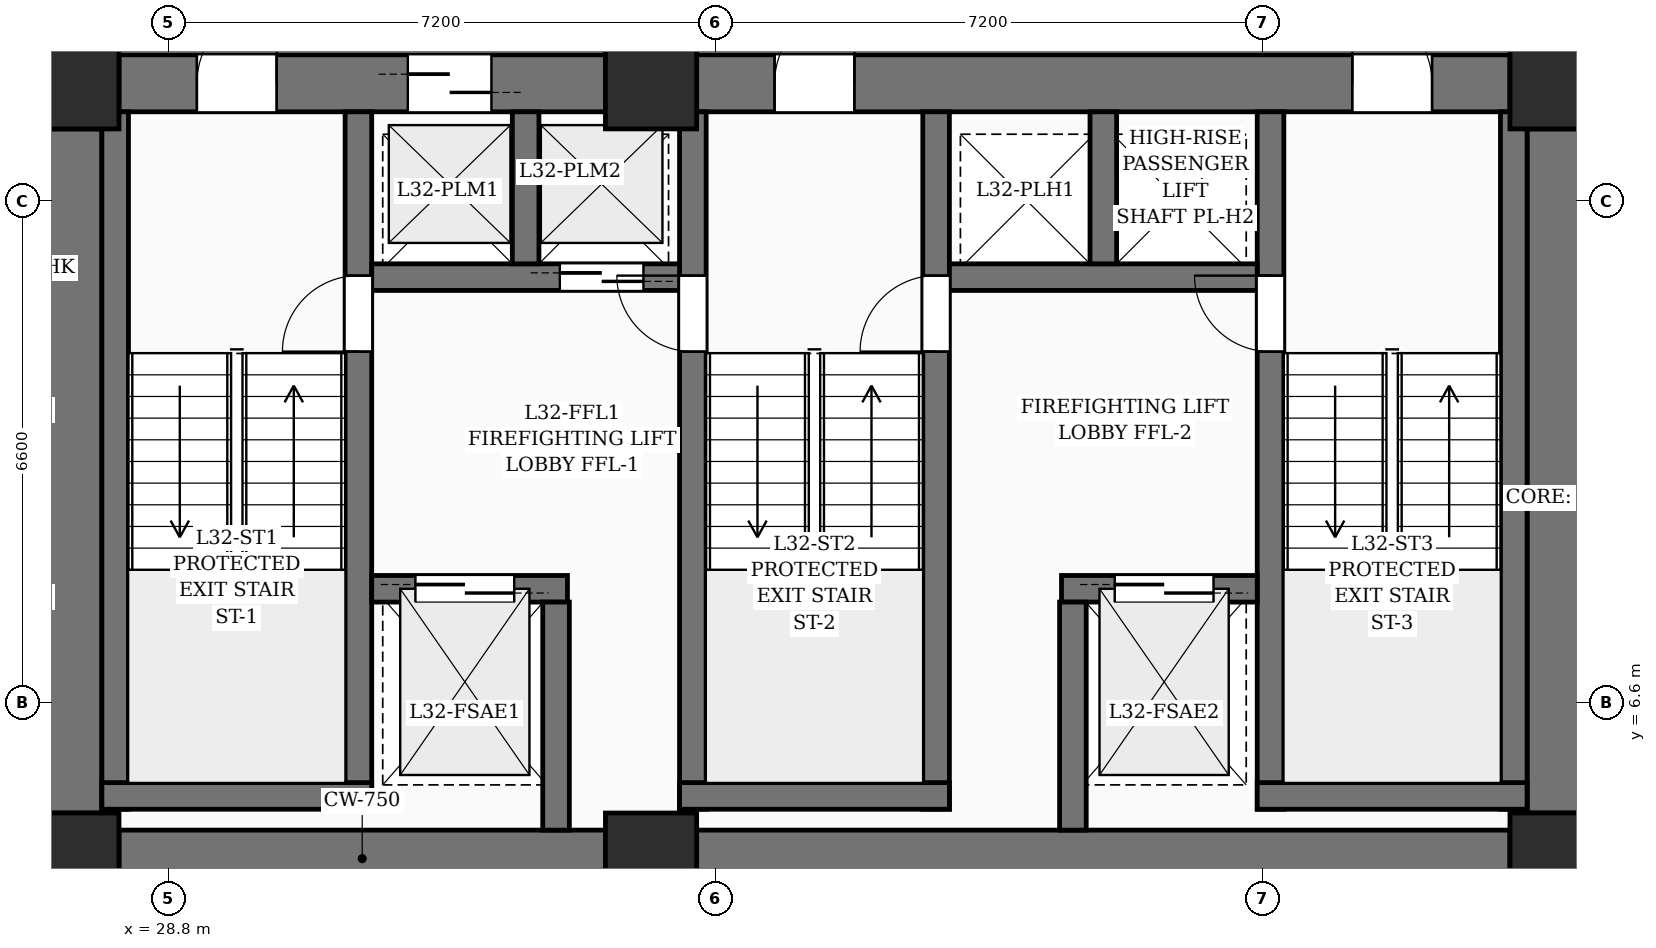
"""IFC4 building model, lengths in metres.
Left out: names, types, materials, properties, quantities, classifications, styles, units other than length and angle.
Written with IfcOpenShell. Run it as: python <this file> out.ifc"""

import sys

from ifc_helpers import new_model, si_unit, direction, frame, frame_2d, origin, origin_2d, place, context, subcontext, project, spatial, rectangle, extrude, element, fill, save


model = new_model("IFC4")
c1 = context("Model", 3, precision=1e-05, world=origin(), true_north=direction((0.0, 1.0)))
c2 = subcontext(c1, "Body", "Model", "MODEL_VIEW")
j1 = project(units=[si_unit("LENGTHUNIT", "METRE"), si_unit("PLANEANGLEUNIT", "RADIAN")], contexts=[c1])
p1 = place(None, origin())
s1 = spatial("IfcSite", under=j1, at=p1, CompositionType="ELEMENT")
p2 = place(p1, origin())
s2 = spatial("IfcBuilding", under=s1, at=p2, CompositionType="ELEMENT")
p3 = place(p2, frame((0.0, 0.0, 128.4)))
s3 = spatial("IfcBuildingStorey", under=s2, at=p3, CompositionType="ELEMENT", Elevation=128.4)
for number, where, z_axis, x_axis in (
    (1, (27.55, 4.55, 0.0), (0.0, 0.0, 1.0), (1.0, 0.0, 0.0)),
    (2, (35.15, 4.55, 0.0), (0.0, 0.0, 1.0), (1.0, 0.0, 0.0)),
    (3, (47.05, 4.55, 0.0), (0.0, 0.0, 1.0), (1.0, 0.0, 0.0)),
    (4, (27.55, 14.75, 0.0), (0.0, 0.0, 1.0), (1.0, 0.0, 0.0)),
    (5, (35.15, 14.75, 0.0), (0.0, 0.0, 1.0), (1.0, 0.0, 0.0)),
    (6, (47.05, 14.75, 0.0), (0.0, 0.0, 1.0), (1.0, 0.0, 0.0)),
):
    element("IfcColumn", number, at=place(p3, frame(where, z_axis=z_axis, x_axis=x_axis)), inside=s3, PredefinedType="COLUMN", context=c2, shape_type="SweptSolid", body=[
        extrude(rectangle(XDim=1.2, YDim=1.2, at=origin_2d()), origin(), (0.0, 0.0, 1.0), 3.6),
    ])
p4 = place(p3, frame((28.15, 4.55, 0.0), z_axis=(0.0, 0.0, 1.0), x_axis=(1.0, 0.0, 0.0)))
e7 = element("IfcWall", 7, at=p4, inside=s3, PredefinedType="SHEAR", context=c2, shape_type="SweptSolid", body=[
    extrude(rectangle(XDim=6.4, YDim=0.75, at=frame_2d((3.2, 0.0))), origin(), (0.0, 0.0, 1.0), 3.6),
])
p5 = place(p3, frame((35.75, 4.55, 0.0), z_axis=(0.0, 0.0, 1.0), x_axis=(1.0, 0.0, 0.0)))
e8 = element("IfcWall", 8, at=p5, inside=s3, PredefinedType="SHEAR", context=c2, shape_type="SweptSolid", body=[
    extrude(rectangle(XDim=10.7, YDim=0.75, at=frame_2d((5.35, 0.0))), origin(), (0.0, 0.0, 1.0), 3.6),
])
p6 = place(p3, frame((28.15, 14.75, 0.0), z_axis=(0.0, 0.0, 1.0), x_axis=(1.0, 0.0, 0.0)))
e9 = element("IfcWall", 9, at=p6, inside=s3, PredefinedType="SHEAR", context=c2, shape_type="SweptSolid", body=[
    extrude(rectangle(XDim=6.4, YDim=0.75, at=frame_2d((3.2, 0.0))), origin(), (0.0, 0.0, 1.0), 3.6),
])
p7 = place(p6, frame((1.025, 0.0, 0.0)))
e10 = element("IfcOpeningElement", 10, at=p7, cuts=e9, PredefinedType="OPENING", context=c2, shape_type="SweptSolid", body=[
    extrude(rectangle(XDim=1.05, YDim=2.15, at=frame_2d((0.525, 1.075))), frame((0.0, 0.385, 0.0), z_axis=(0.0, -1.0, 0.0), x_axis=(1.0, 0.0, 0.0)), (0.0, 0.0, 1.0), 0.77),
])
p8 = place(p6, frame((3.8, 0.0, 0.0)))
e11 = element("IfcOpeningElement", 11, at=p8, cuts=e9, PredefinedType="OPENING", context=c2, shape_type="SweptSolid", body=[
    extrude(rectangle(XDim=1.1, YDim=2.2, at=frame_2d((0.55, 1.1))), frame((0.0, 0.385, 0.0), z_axis=(0.0, -1.0, 0.0), x_axis=(1.0, 0.0, 0.0)), (0.0, 0.0, 1.0), 0.77),
])
p9 = place(p3, frame((35.75, 14.75, 0.0), z_axis=(0.0, 0.0, 1.0), x_axis=(1.0, 0.0, 0.0)))
e12 = element("IfcWall", 12, at=p9, inside=s3, PredefinedType="SHEAR", context=c2, shape_type="SweptSolid", body=[
    extrude(rectangle(XDim=10.7, YDim=0.75, at=frame_2d((5.35, 0.0))), origin(), (0.0, 0.0, 1.0), 3.6),
])
p10 = place(p9, frame((1.025, 0.0, 0.0)))
e13 = element("IfcOpeningElement", 13, at=p10, cuts=e12, PredefinedType="OPENING", context=c2, shape_type="SweptSolid", body=[
    extrude(rectangle(XDim=1.05, YDim=2.15, at=frame_2d((0.525, 1.075))), frame((0.0, 0.385, 0.0), z_axis=(0.0, -1.0, 0.0), x_axis=(1.0, 0.0, 0.0)), (0.0, 0.0, 1.0), 0.77),
])
p11 = place(p9, frame((8.625, 0.0, 0.0)))
e14 = element("IfcOpeningElement", 14, at=p11, cuts=e12, PredefinedType="OPENING", context=c2, shape_type="SweptSolid", body=[
    extrude(rectangle(XDim=1.05, YDim=2.15, at=frame_2d((0.525, 1.075))), frame((0.0, 0.385, 0.0), z_axis=(0.0, -1.0, 0.0), x_axis=(1.0, 0.0, 0.0)), (0.0, 0.0, 1.0), 0.77),
])
for number, where, z_axis, x_axis in (
    (15, (27.55, 5.15, 0.0), (0.0, 0.0, 1.0), (0.0, 1.0, 0.0)),
    (16, (47.05, 5.15, 0.0), (0.0, 0.0, 1.0), (0.0, 1.0, 0.0)),
):
    element("IfcWall", number, at=place(p3, frame(where, z_axis=z_axis, x_axis=x_axis)), inside=s3, PredefinedType="SHEAR", context=c2, shape_type="SweptSolid", body=[
        extrude(rectangle(XDim=9.0, YDim=0.75, at=frame_2d((4.5, 0.0))), origin(), (0.0, 0.0, 1.0), 3.6),
    ])
p12 = place(p3, frame((28.1, 5.2, 0.0), z_axis=(0.0, 0.0, 1.0), x_axis=(0.0, 1.0, 0.0)))
e17 = element("IfcWall", 17, at=p12, inside=s3, PredefinedType="SOLIDWALL", context=c2, shape_type="SweptSolid", body=[
    extrude(rectangle(XDim=9.175, YDim=0.35, at=frame_2d((4.587, 0.0))), origin(), (0.0, 0.0, 1.0), 3.6),
])
p13 = place(p3, frame((31.3, 5.2, 0.0), z_axis=(0.0, 0.0, 1.0), x_axis=(0.0, 1.0, 0.0)))
e18 = element("IfcWall", 18, at=p13, inside=s3, PredefinedType="SOLIDWALL", context=c2, shape_type="SweptSolid", body=[
    extrude(rectangle(XDim=9.175, YDim=0.35, at=frame_2d((4.587, 0.0))), origin(), (0.0, 0.0, 1.0), 3.6),
])
p14 = place(p13, frame((6.02, 0.0, 0.0)))
e19 = element("IfcOpeningElement", 19, at=p14, cuts=e18, PredefinedType="OPENING", context=c2, shape_type="SweptSolid", body=[
    extrude(rectangle(XDim=1.0, YDim=2.15, at=frame_2d((0.5, 1.075))), frame((0.0, 0.185, 0.0), z_axis=(0.0, -1.0, 0.0), x_axis=(1.0, 0.0, 0.0)), (0.0, 0.0, 1.0), 0.37),
])
p15 = place(p3, frame((27.925, 5.375, 0.0), z_axis=(0.0, 0.0, 1.0), x_axis=(1.0, 0.0, 0.0)))
e20 = element("IfcWall", 20, at=p15, inside=s3, PredefinedType="SOLIDWALL", context=c2, shape_type="SweptSolid", body=[
    extrude(rectangle(XDim=3.55, YDim=0.35, at=frame_2d((1.775, 0.0))), origin(), (0.0, 0.0, 1.0), 3.6),
])
p16 = place(p3, frame((35.7, 5.2, 0.0), z_axis=(0.0, 0.0, 1.0), x_axis=(0.0, 1.0, 0.0)))
e21 = element("IfcWall", 21, at=p16, inside=s3, PredefinedType="SOLIDWALL", context=c2, shape_type="SweptSolid", body=[
    extrude(rectangle(XDim=9.175, YDim=0.35, at=frame_2d((4.587, 0.0))), origin(), (0.0, 0.0, 1.0), 3.6),
])
p17 = place(p16, frame((6.02, 0.0, 0.0)))
e22 = element("IfcOpeningElement", 22, at=p17, cuts=e21, PredefinedType="OPENING", context=c2, shape_type="SweptSolid", body=[
    extrude(rectangle(XDim=1.0, YDim=2.15, at=frame_2d((0.5, 1.075))), frame((0.0, 0.185, 0.0), z_axis=(0.0, -1.0, 0.0), x_axis=(1.0, 0.0, 0.0)), (0.0, 0.0, 1.0), 0.37),
])
p18 = place(p3, frame((38.9, 5.2, 0.0), z_axis=(0.0, 0.0, 1.0), x_axis=(0.0, 1.0, 0.0)))
e23 = element("IfcWall", 23, at=p18, inside=s3, PredefinedType="SOLIDWALL", context=c2, shape_type="SweptSolid", body=[
    extrude(rectangle(XDim=9.175, YDim=0.35, at=frame_2d((4.587, 0.0))), origin(), (0.0, 0.0, 1.0), 3.6),
])
p19 = place(p18, frame((6.02, 0.0, 0.0)))
e24 = element("IfcOpeningElement", 24, at=p19, cuts=e23, PredefinedType="OPENING", context=c2, shape_type="SweptSolid", body=[
    extrude(rectangle(XDim=1.0, YDim=2.15, at=frame_2d((0.5, 1.075))), frame((0.0, 0.185, 0.0), z_axis=(0.0, -1.0, 0.0), x_axis=(1.0, 0.0, 0.0)), (0.0, 0.0, 1.0), 0.37),
])
p20 = place(p3, frame((35.525, 5.375, 0.0), z_axis=(0.0, 0.0, 1.0), x_axis=(1.0, 0.0, 0.0)))
e25 = element("IfcWall", 25, at=p20, inside=s3, PredefinedType="SOLIDWALL", context=c2, shape_type="SweptSolid", body=[
    extrude(rectangle(XDim=3.55, YDim=0.35, at=frame_2d((1.775, 0.0))), origin(), (0.0, 0.0, 1.0), 3.6),
])
p21 = place(p3, frame((43.3, 5.2, 0.0), z_axis=(0.0, 0.0, 1.0), x_axis=(0.0, 1.0, 0.0)))
e26 = element("IfcWall", 26, at=p21, inside=s3, PredefinedType="SOLIDWALL", context=c2, shape_type="SweptSolid", body=[
    extrude(rectangle(XDim=9.175, YDim=0.35, at=frame_2d((4.587, 0.0))), origin(), (0.0, 0.0, 1.0), 3.6),
])
p22 = place(p21, frame((6.02, 0.0, 0.0)))
e27 = element("IfcOpeningElement", 27, at=p22, cuts=e26, PredefinedType="OPENING", context=c2, shape_type="SweptSolid", body=[
    extrude(rectangle(XDim=1.0, YDim=2.15, at=frame_2d((0.5, 1.075))), frame((0.0, 0.185, 0.0), z_axis=(0.0, -1.0, 0.0), x_axis=(1.0, 0.0, 0.0)), (0.0, 0.0, 1.0), 0.37),
])
p23 = place(p3, frame((46.5, 5.2, 0.0), z_axis=(0.0, 0.0, 1.0), x_axis=(0.0, 1.0, 0.0)))
e28 = element("IfcWall", 28, at=p23, inside=s3, PredefinedType="SOLIDWALL", context=c2, shape_type="SweptSolid", body=[
    extrude(rectangle(XDim=9.175, YDim=0.35, at=frame_2d((4.587, 0.0))), origin(), (0.0, 0.0, 1.0), 3.6),
])
p24 = place(p3, frame((43.125, 5.375, 0.0), z_axis=(0.0, 0.0, 1.0), x_axis=(1.0, 0.0, 0.0)))
e29 = element("IfcWall", 29, at=p24, inside=s3, PredefinedType="SOLIDWALL", context=c2, shape_type="SweptSolid", body=[
    extrude(rectangle(XDim=3.55, YDim=0.35, at=frame_2d((1.775, 0.0))), origin(), (0.0, 0.0, 1.0), 3.6),
])
p25 = place(p3, frame((31.475, 8.1, 0.0), z_axis=(0.0, 0.0, 1.0), x_axis=(1.0, 0.0, 0.0)))
e30 = element("IfcWall", 30, at=p25, inside=s3, PredefinedType="SOLIDWALL", context=c2, shape_type="SweptSolid", body=[
    extrude(rectangle(XDim=2.575, YDim=0.35, at=frame_2d((1.288, 0.0))), origin(), (0.0, 0.0, 1.0), 3.6),
])
p26 = place(p25, frame((0.575, 0.0, 0.0)))
e31 = element("IfcOpeningElement", 31, at=p26, cuts=e30, PredefinedType="OPENING", context=c2, shape_type="SweptSolid", body=[
    extrude(rectangle(XDim=1.3, YDim=2.25, at=frame_2d((0.65, 1.125))), frame((0.0, 0.185, 0.0), z_axis=(0.0, -1.0, 0.0), x_axis=(1.0, 0.0, 0.0)), (0.0, 0.0, 1.0), 0.37),
])
p27 = place(p3, frame((40.55, 8.1, 0.0), z_axis=(0.0, 0.0, 1.0), x_axis=(1.0, 0.0, 0.0)))
e32 = element("IfcWall", 32, at=p27, inside=s3, PredefinedType="SOLIDWALL", context=c2, shape_type="SweptSolid", body=[
    extrude(rectangle(XDim=2.575, YDim=0.35, at=frame_2d((1.288, 0.0))), origin(), (0.0, 0.0, 1.0), 3.6),
])
p28 = place(p27, frame((0.7, 0.0, 0.0)))
e33 = element("IfcOpeningElement", 33, at=p28, cuts=e32, PredefinedType="OPENING", context=c2, shape_type="SweptSolid", body=[
    extrude(rectangle(XDim=1.3, YDim=2.25, at=frame_2d((0.65, 1.125))), frame((0.0, 0.185, 0.0), z_axis=(0.0, -1.0, 0.0), x_axis=(1.0, 0.0, 0.0)), (0.0, 0.0, 1.0), 0.37),
])
for number, where, z_axis, x_axis in (
    (34, (33.9, 4.925, 0.0), (0.0, 0.0, 1.0), (0.0, 1.0, 0.0)),
    (35, (40.7, 4.925, 0.0), (0.0, 0.0, 1.0), (0.0, 1.0, 0.0)),
):
    element("IfcWall", number, at=place(p3, frame(where, z_axis=z_axis, x_axis=x_axis)), inside=s3, PredefinedType="SOLIDWALL", context=c2, shape_type="SweptSolid", body=[
        extrude(rectangle(XDim=3.0, YDim=0.35, at=frame_2d((1.5, 0.0))), origin(), (0.0, 0.0, 1.0), 3.6),
    ])
p29 = place(p3, frame((31.475, 12.2, 0.0), z_axis=(0.0, 0.0, 1.0), x_axis=(1.0, 0.0, 0.0)))
e36 = element("IfcWall", 36, at=p29, inside=s3, PredefinedType="SOLIDWALL", context=c2, shape_type="SweptSolid", body=[
    extrude(rectangle(XDim=4.05, YDim=0.35, at=frame_2d((2.025, 0.0))), origin(), (0.0, 0.0, 1.0), 3.6),
])
p30 = place(p29, frame((2.475, 0.0, 0.0)))
e37 = element("IfcOpeningElement", 37, at=p30, cuts=e36, PredefinedType="OPENING", context=c2, shape_type="SweptSolid", body=[
    extrude(rectangle(XDim=1.1, YDim=2.2, at=frame_2d((0.55, 1.1))), frame((0.0, 0.185, 0.0), z_axis=(0.0, -1.0, 0.0), x_axis=(1.0, 0.0, 0.0)), (0.0, 0.0, 1.0), 0.37),
])
p31 = place(p3, frame((33.5, 12.375, 0.0), z_axis=(0.0, 0.0, 1.0), x_axis=(0.0, 1.0, 0.0)))
e38 = element("IfcWall", 38, at=p31, inside=s3, PredefinedType="SOLIDWALL", context=c2, shape_type="SweptSolid", body=[
    extrude(rectangle(XDim=2.0, YDim=0.35, at=frame_2d((1.0, 0.0))), origin(), (0.0, 0.0, 1.0), 3.6),
])
p32 = place(p3, frame((39.075, 12.2, 0.0), z_axis=(0.0, 0.0, 1.0), x_axis=(1.0, 0.0, 0.0)))
e39 = element("IfcWall", 39, at=p32, inside=s3, PredefinedType="SOLIDWALL", context=c2, shape_type="SweptSolid", body=[
    extrude(rectangle(XDim=4.05, YDim=0.35, at=frame_2d((2.025, 0.0))), origin(), (0.0, 0.0, 1.0), 3.6),
])
p33 = place(p3, frame((41.1, 12.375, 0.0), z_axis=(0.0, 0.0, 1.0), x_axis=(0.0, 1.0, 0.0)))
e40 = element("IfcWall", 40, at=p33, inside=s3, PredefinedType="SOLIDWALL", context=c2, shape_type="SweptSolid", body=[
    extrude(rectangle(XDim=2.0, YDim=0.35, at=frame_2d((1.0, 0.0))), origin(), (0.0, 0.0, 1.0), 3.6),
])
p34 = place(p7, origin())
e41 = element("IfcDoor", 41, at=p34, inside=s3, OperationType="SINGLE_SWING_RIGHT", PredefinedType="DOOR", context=c2, shape_type="SweptSolid", body=[
    extrude(rectangle(XDim=1.05, YDim=2.15, at=frame_2d((0.525, 1.075))), frame((0.0, 0.025, 0.0), z_axis=(0.0, -1.0, 0.0), x_axis=(1.0, 0.0, 0.0)), (0.0, 0.0, 1.0), 0.05),
])
fill(e10, e41)
p35 = place(p10, origin())
e42 = element("IfcDoor", 42, at=p35, inside=s3, OperationType="SINGLE_SWING_RIGHT", PredefinedType="DOOR", context=c2, shape_type="SweptSolid", body=[
    extrude(rectangle(XDim=1.05, YDim=2.15, at=frame_2d((0.525, 1.075))), frame((0.0, 0.025, 0.0), z_axis=(0.0, -1.0, 0.0), x_axis=(1.0, 0.0, 0.0)), (0.0, 0.0, 1.0), 0.05),
])
fill(e13, e42)
p36 = place(p11, origin())
e43 = element("IfcDoor", 43, at=p36, inside=s3, OperationType="SINGLE_SWING_LEFT", PredefinedType="DOOR", context=c2, shape_type="SweptSolid", body=[
    extrude(rectangle(XDim=1.05, YDim=2.15, at=frame_2d((0.525, 1.075))), frame((0.0, 0.025, 0.0), z_axis=(0.0, -1.0, 0.0), x_axis=(1.0, 0.0, 0.0)), (0.0, 0.0, 1.0), 0.05),
])
fill(e14, e43)
p37 = place(p14, origin())
e44 = element("IfcDoor", 44, at=p37, inside=s3, OperationType="SINGLE_SWING_LEFT", PredefinedType="DOOR", context=c2, shape_type="SweptSolid", body=[
    extrude(rectangle(XDim=1.0, YDim=2.15, at=frame_2d((0.5, 1.075))), frame((0.0, 0.025, 0.0), z_axis=(0.0, -1.0, 0.0), x_axis=(1.0, 0.0, 0.0)), (0.0, 0.0, 1.0), 0.05),
])
fill(e19, e44)
p38 = place(p17, origin())
e45 = element("IfcDoor", 45, at=p38, inside=s3, OperationType="SINGLE_SWING_RIGHT", PredefinedType="DOOR", context=c2, shape_type="SweptSolid", body=[
    extrude(rectangle(XDim=1.0, YDim=2.15, at=frame_2d((0.5, 1.075))), frame((0.0, 0.025, 0.0), z_axis=(0.0, -1.0, 0.0), x_axis=(1.0, 0.0, 0.0)), (0.0, 0.0, 1.0), 0.05),
])
fill(e22, e45)
p39 = place(p19, origin())
e46 = element("IfcDoor", 46, at=p39, inside=s3, OperationType="SINGLE_SWING_LEFT", PredefinedType="DOOR", context=c2, shape_type="SweptSolid", body=[
    extrude(rectangle(XDim=1.0, YDim=2.15, at=frame_2d((0.5, 1.075))), frame((0.0, 0.025, 0.0), z_axis=(0.0, -1.0, 0.0), x_axis=(1.0, 0.0, 0.0)), (0.0, 0.0, 1.0), 0.05),
])
fill(e24, e46)
p40 = place(p22, origin())
e47 = element("IfcDoor", 47, at=p40, inside=s3, OperationType="SINGLE_SWING_RIGHT", PredefinedType="DOOR", context=c2, shape_type="SweptSolid", body=[
    extrude(rectangle(XDim=1.0, YDim=2.15, at=frame_2d((0.5, 1.075))), frame((0.0, 0.025, 0.0), z_axis=(0.0, -1.0, 0.0), x_axis=(1.0, 0.0, 0.0)), (0.0, 0.0, 1.0), 0.05),
])
fill(e27, e47)
p41 = place(p26, origin())
e48 = element("IfcDoor", 48, at=p41, inside=s3, OperationType="DOUBLE_DOOR_SLIDING", PredefinedType="DOOR", context=c2, shape_type="SweptSolid", body=[
    extrude(rectangle(XDim=1.3, YDim=2.25, at=frame_2d((0.65, 1.125))), frame((0.0, 0.025, 0.0), z_axis=(0.0, -1.0, 0.0), x_axis=(1.0, 0.0, 0.0)), (0.0, 0.0, 1.0), 0.05),
])
fill(e31, e48)
p42 = place(p28, origin())
e49 = element("IfcDoor", 49, at=p42, inside=s3, OperationType="DOUBLE_DOOR_SLIDING", PredefinedType="DOOR", context=c2, shape_type="SweptSolid", body=[
    extrude(rectangle(XDim=1.3, YDim=2.25, at=frame_2d((0.65, 1.125))), frame((0.0, 0.025, 0.0), z_axis=(0.0, -1.0, 0.0), x_axis=(1.0, 0.0, 0.0)), (0.0, 0.0, 1.0), 0.05),
])
fill(e33, e49)
p43 = place(p8, origin())
e50 = element("IfcDoor", 50, at=p43, inside=s3, OperationType="DOUBLE_DOOR_SLIDING", PredefinedType="DOOR", context=c2, shape_type="SweptSolid", body=[
    extrude(rectangle(XDim=1.1, YDim=2.2, at=frame_2d((0.55, 1.1))), frame((0.0, 0.025, 0.0), z_axis=(0.0, -1.0, 0.0), x_axis=(1.0, 0.0, 0.0)), (0.0, 0.0, 1.0), 0.05),
])
fill(e11, e50)
p44 = place(p30, origin())
e51 = element("IfcDoor", 51, at=p44, inside=s3, OperationType="DOUBLE_DOOR_SLIDING", PredefinedType="DOOR", context=c2, shape_type="SweptSolid", body=[
    extrude(rectangle(XDim=1.1, YDim=2.2, at=frame_2d((0.55, 1.1))), frame((0.0, 0.025, 0.0), z_axis=(0.0, -1.0, 0.0), x_axis=(1.0, 0.0, 0.0)), (0.0, 0.0, 1.0), 0.05),
])
fill(e37, e51)
save(model, sys.argv[1])
